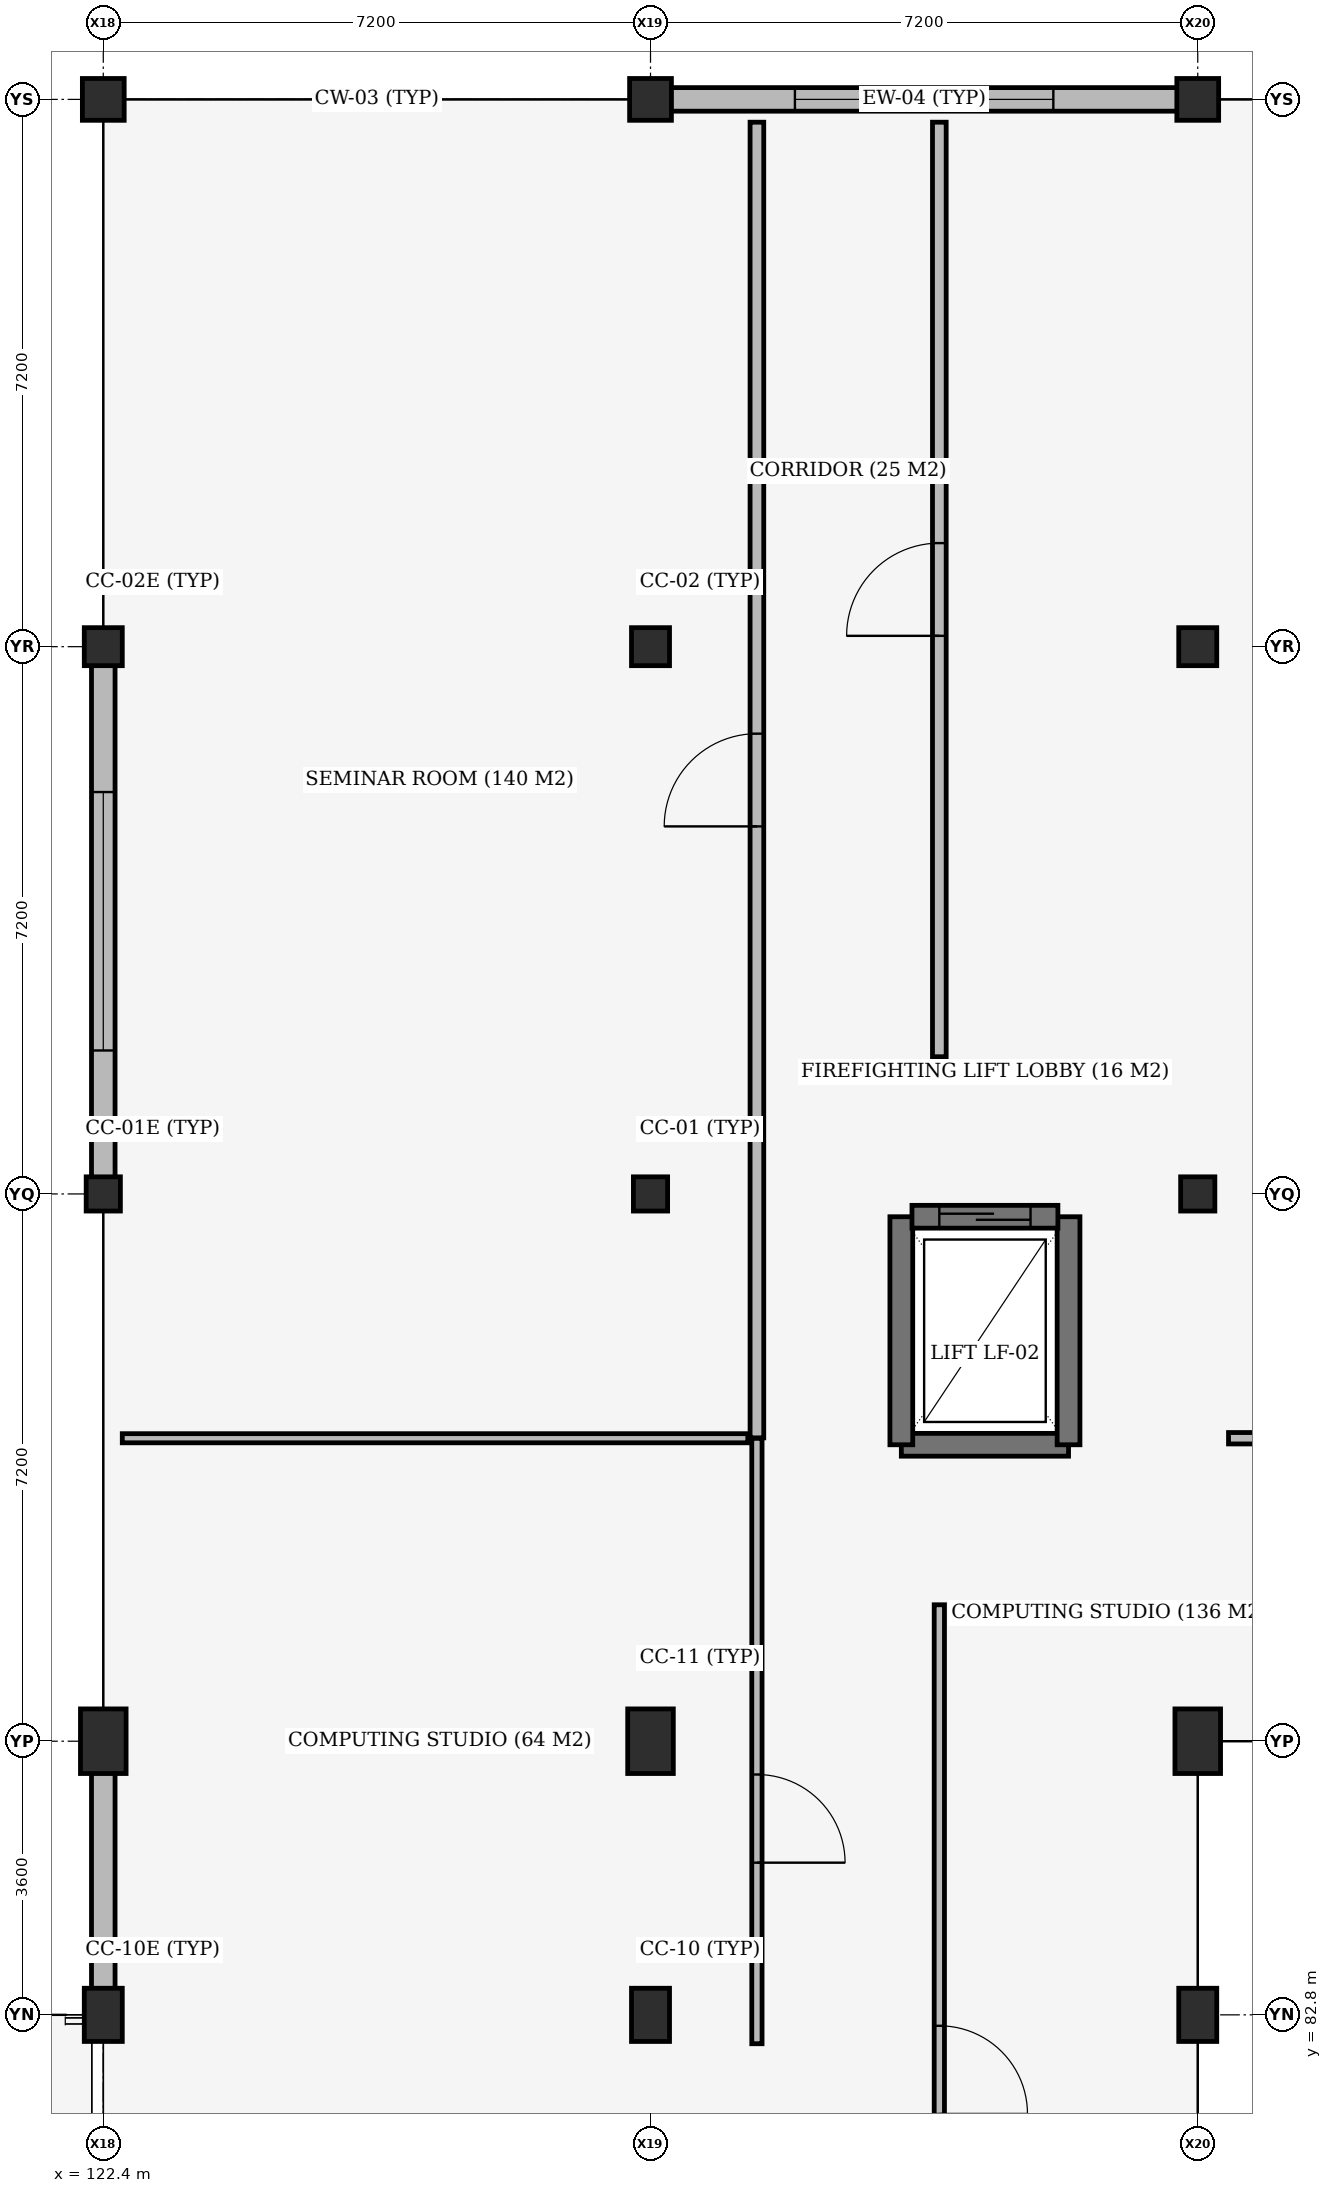
"""IFC4 building model, lengths in metres.
Left out: names, types, materials, properties, quantities, classifications, styles, units other than length and angle.
Written with IfcOpenShell. Run it as: python <this file> out.ifc"""

import sys

from ifc_helpers import new_model, si_unit, direction, frame, frame_2d, origin, origin_2d, place, context, subcontext, project, spatial, rectangle, extrude, element, fill, save


model = new_model("IFC4")
c1 = context("Model", 3, precision=1e-05, world=origin(), true_north=direction((0.0, 1.0)))
c2 = subcontext(c1, "Body", "Model", "MODEL_VIEW")
j1 = project(units=[si_unit("LENGTHUNIT", "METRE"), si_unit("PLANEANGLEUNIT", "RADIAN")], contexts=[c1])
p1 = place(None, origin())
s1 = spatial("IfcSite", under=j1, at=p1, CompositionType="ELEMENT")
p2 = place(p1, origin())
s2 = spatial("IfcBuilding", under=s1, at=p2, CompositionType="ELEMENT")
p3 = place(p2, frame((0.0, 0.0, 5.4)))
s3 = spatial("IfcBuildingStorey", under=s2, at=p3, CompositionType="ELEMENT", Elevation=5.4)
p4 = place(p3, frame((122.4, 82.8, 0.0), z_axis=(0.0, 0.0, 1.0), x_axis=(1.0, 0.0, 0.0)))
e1 = element("IfcColumn", 1, at=p4, inside=s3, PredefinedType="COLUMN", context=c2, shape_type="SweptSolid", body=[
    extrude(rectangle(XDim=0.5, YDim=0.7, at=origin_2d()), origin(), (0.0, 0.0, 1.0), 3.92),
])
p5 = place(p3, frame((122.4, 86.4, 0.0), z_axis=(0.0, 0.0, 1.0), x_axis=(1.0, 0.0, 0.0)))
e2 = element("IfcColumn", 2, at=p5, inside=s3, PredefinedType="COLUMN", context=c2, shape_type="SweptSolid", body=[
    extrude(rectangle(XDim=0.6, YDim=0.85, at=origin_2d()), origin(), (0.0, 0.0, 1.0), 3.92),
])
p6 = place(p3, frame((122.4, 93.6, 0.0), z_axis=(0.0, 0.0, 1.0), x_axis=(1.0, 0.0, 0.0)))
e3 = element("IfcColumn", 3, at=p6, inside=s3, PredefinedType="COLUMN", context=c2, shape_type="SweptSolid", body=[
    extrude(rectangle(XDim=0.45, YDim=0.45, at=origin_2d()), origin(), (0.0, 0.0, 1.0), 3.92),
])
p7 = place(p3, frame((122.4, 100.8, 0.0), z_axis=(0.0, 0.0, 1.0), x_axis=(1.0, 0.0, 0.0)))
e4 = element("IfcColumn", 4, at=p7, inside=s3, PredefinedType="COLUMN", context=c2, shape_type="SweptSolid", body=[
    extrude(rectangle(XDim=0.5, YDim=0.5, at=origin_2d()), origin(), (0.0, 0.0, 1.0), 3.92),
])
p8 = place(p3, frame((122.4, 108.0, 0.0), z_axis=(0.0, 0.0, 1.0), x_axis=(1.0, 0.0, 0.0)))
e5 = element("IfcColumn", 5, at=p8, inside=s3, PredefinedType="COLUMN", context=c2, shape_type="SweptSolid", body=[
    extrude(rectangle(XDim=0.55, YDim=0.55, at=origin_2d()), origin(), (0.0, 0.0, 1.0), 3.92),
])
p9 = place(p3, frame((129.6, 82.8, 0.0), z_axis=(0.0, 0.0, 1.0), x_axis=(1.0, 0.0, 0.0)))
e6 = element("IfcColumn", 6, at=p9, inside=s3, PredefinedType="COLUMN", context=c2, shape_type="SweptSolid", body=[
    extrude(rectangle(XDim=0.5, YDim=0.7, at=origin_2d()), origin(), (0.0, 0.0, 1.0), 3.92),
])
p10 = place(p3, frame((129.6, 86.4, 0.0), z_axis=(0.0, 0.0, 1.0), x_axis=(1.0, 0.0, 0.0)))
e7 = element("IfcColumn", 7, at=p10, inside=s3, PredefinedType="COLUMN", context=c2, shape_type="SweptSolid", body=[
    extrude(rectangle(XDim=0.6, YDim=0.85, at=origin_2d()), origin(), (0.0, 0.0, 1.0), 3.92),
])
p11 = place(p3, frame((129.6, 93.6, 0.0), z_axis=(0.0, 0.0, 1.0), x_axis=(1.0, 0.0, 0.0)))
e8 = element("IfcColumn", 8, at=p11, inside=s3, PredefinedType="COLUMN", context=c2, shape_type="SweptSolid", body=[
    extrude(rectangle(XDim=0.45, YDim=0.45, at=origin_2d()), origin(), (0.0, 0.0, 1.0), 3.92),
])
p12 = place(p3, frame((129.6, 100.8, 0.0), z_axis=(0.0, 0.0, 1.0), x_axis=(1.0, 0.0, 0.0)))
e9 = element("IfcColumn", 9, at=p12, inside=s3, PredefinedType="COLUMN", context=c2, shape_type="SweptSolid", body=[
    extrude(rectangle(XDim=0.5, YDim=0.5, at=origin_2d()), origin(), (0.0, 0.0, 1.0), 3.92),
])
p13 = place(p3, frame((129.6, 108.0, 0.0), z_axis=(0.0, 0.0, 1.0), x_axis=(1.0, 0.0, 0.0)))
e10 = element("IfcColumn", 10, at=p13, inside=s3, PredefinedType="COLUMN", context=c2, shape_type="SweptSolid", body=[
    extrude(rectangle(XDim=0.55, YDim=0.55, at=origin_2d()), origin(), (0.0, 0.0, 1.0), 3.92),
])
p14 = place(p3, frame((136.8, 82.8, 0.0), z_axis=(0.0, 0.0, 1.0), x_axis=(1.0, 0.0, 0.0)))
e11 = element("IfcColumn", 11, at=p14, inside=s3, PredefinedType="COLUMN", context=c2, shape_type="SweptSolid", body=[
    extrude(rectangle(XDim=0.5, YDim=0.7, at=origin_2d()), origin(), (0.0, 0.0, 1.0), 3.92),
])
p15 = place(p3, frame((136.8, 86.4, 0.0), z_axis=(0.0, 0.0, 1.0), x_axis=(1.0, 0.0, 0.0)))
e12 = element("IfcColumn", 12, at=p15, inside=s3, PredefinedType="COLUMN", context=c2, shape_type="SweptSolid", body=[
    extrude(rectangle(XDim=0.6, YDim=0.85, at=origin_2d()), origin(), (0.0, 0.0, 1.0), 3.92),
])
p16 = place(p3, frame((136.8, 93.6, 0.0), z_axis=(0.0, 0.0, 1.0), x_axis=(1.0, 0.0, 0.0)))
e13 = element("IfcColumn", 13, at=p16, inside=s3, PredefinedType="COLUMN", context=c2, shape_type="SweptSolid", body=[
    extrude(rectangle(XDim=0.45, YDim=0.45, at=origin_2d()), origin(), (0.0, 0.0, 1.0), 3.92),
])
p17 = place(p3, frame((136.8, 100.8, 0.0), z_axis=(0.0, 0.0, 1.0), x_axis=(1.0, 0.0, 0.0)))
e14 = element("IfcColumn", 14, at=p17, inside=s3, PredefinedType="COLUMN", context=c2, shape_type="SweptSolid", body=[
    extrude(rectangle(XDim=0.5, YDim=0.5, at=origin_2d()), origin(), (0.0, 0.0, 1.0), 3.92),
])
p18 = place(p3, frame((136.8, 108.0, 0.0), z_axis=(0.0, 0.0, 1.0), x_axis=(1.0, 0.0, 0.0)))
e15 = element("IfcColumn", 15, at=p18, inside=s3, PredefinedType="COLUMN", context=c2, shape_type="SweptSolid", body=[
    extrude(rectangle(XDim=0.55, YDim=0.55, at=origin_2d()), origin(), (0.0, 0.0, 1.0), 3.92),
])
p19 = place(p3, frame((132.9, 90.3, 0.0), z_axis=(0.0, 0.0, 1.0), x_axis=(1.0, 0.0, 0.0)))
e16 = element("IfcWall", 16, at=p19, inside=s3, PredefinedType="SHEAR", context=c2, shape_type="SweptSolid", body=[
    extrude(rectangle(XDim=2.2, YDim=0.3, at=frame_2d((1.1, 0.0))), origin(), (0.0, 0.0, 1.0), 3.92),
])
for number, where, z_axis, x_axis in (
    (17, (132.9, 93.3, 0.0), (0.0, 0.0, 1.0), (0.0, -1.0, 0.0)),
    (18, (135.1, 90.3, 0.0), (0.0, 0.0, 1.0), (0.0, 1.0, 0.0)),
):
    element("IfcWall", number, at=place(p3, frame(where, z_axis=z_axis, x_axis=x_axis)), inside=s3, PredefinedType="SHEAR", context=c2, shape_type="SweptSolid", body=[
        extrude(rectangle(XDim=3.0, YDim=0.3, at=frame_2d((1.5, 0.0))), origin(), (0.0, 0.0, 1.0), 3.92),
    ])
p20 = place(p3, frame((129.867, 108.0, 0.0), z_axis=(0.0, 0.0, 1.0), x_axis=(1.0, 0.0, 0.0)))
e19 = element("IfcWall", 19, at=p20, inside=s3, PredefinedType="STANDARD", context=c2, shape_type="SweptSolid", body=[
    extrude(rectangle(XDim=6.666, YDim=0.31, at=frame_2d((3.333, 0.0))), origin(), (0.0, 0.0, 1.0), 3.34),
])
p21 = place(p20, frame((1.633, 0.0, 0.9)))
e20 = element("IfcOpeningElement", 20, at=p21, cuts=e19, PredefinedType="OPENING", context=c2, shape_type="SweptSolid", body=[
    extrude(rectangle(XDim=3.4, YDim=1.5, at=frame_2d((1.7, 0.75))), frame((0.0, 0.165, 0.0), z_axis=(0.0, -1.0, 0.0), x_axis=(1.0, 0.0, 0.0)), (0.0, 0.0, 1.0), 0.33),
])
p22 = place(p3, frame((122.4, 83.142, 0.0), z_axis=(0.0, 0.0, 1.0), x_axis=(0.0, 1.0, 0.0)))
e21 = element("IfcWall", 21, at=p22, inside=s3, PredefinedType="STANDARD", context=c2, shape_type="SweptSolid", body=[
    extrude(rectangle(XDim=2.841, YDim=0.31, at=frame_2d((1.42, 0.0))), origin(), (0.0, 0.0, 1.0), 3.28),
])
p23 = place(p3, frame((122.4, 93.817, 0.0), z_axis=(0.0, 0.0, 1.0), x_axis=(0.0, 1.0, 0.0)))
e22 = element("IfcWall", 22, at=p23, inside=s3, PredefinedType="STANDARD", context=c2, shape_type="SweptSolid", body=[
    extrude(rectangle(XDim=6.741, YDim=0.31, at=frame_2d((3.371, 0.0))), origin(), (0.0, 0.0, 1.0), 3.18),
])
p24 = place(p23, frame((1.67, 0.0, 0.9)))
e23 = element("IfcOpeningElement", 23, at=p24, cuts=e22, PredefinedType="OPENING", context=c2, shape_type="SweptSolid", body=[
    extrude(rectangle(XDim=3.4, YDim=1.5, at=frame_2d((1.7, 0.75))), frame((0.0, 0.165, 0.0), z_axis=(0.0, -1.0, 0.0), x_axis=(1.0, 0.0, 0.0)), (0.0, 0.0, 1.0), 0.33),
])
p25 = place(p3, frame((133.04, 93.3, 0.0), z_axis=(0.0, 0.0, 1.0), x_axis=(1.0, 0.0, 0.0)))
e24 = element("IfcWall", 24, at=p25, inside=s3, PredefinedType="SHEAR", context=c2, shape_type="SweptSolid", body=[
    extrude(rectangle(XDim=1.92, YDim=0.3, at=frame_2d((0.96, 0.0))), origin(), (0.0, 0.0, 1.0), 3.92),
])
p26 = place(p25, frame((0.36, 0.0, 0.0)))
e25 = element("IfcOpeningElement", 25, at=p26, cuts=e24, PredefinedType="OPENING", context=c2, shape_type="SweptSolid", body=[
    extrude(rectangle(XDim=1.2, YDim=2.1, at=frame_2d((0.6, 1.05))), frame((0.0, 0.16, 0.0), z_axis=(0.0, -1.0, 0.0), x_axis=(1.0, 0.0, 0.0)), (0.0, 0.0, 1.0), 0.32),
])
p27 = place(p3, frame((131.0, 82.42, 0.0), z_axis=(0.0, 0.0, 1.0), x_axis=(0.0, 1.0, 0.0)))
e26 = element("IfcWall", 26, at=p27, inside=s3, PredefinedType="PARTITIONING", context=c2, shape_type="SweptSolid", body=[
    extrude(rectangle(XDim=7.966, YDim=0.135, at=frame_2d((3.983, 0.0))), origin(), (0.0, 0.0, 1.0), 3.34),
])
p28 = place(p27, frame((2.382, 0.0, 0.0)))
e27 = element("IfcOpeningElement", 27, at=p28, cuts=e26, PredefinedType="OPENING", context=c2, shape_type="SweptSolid", body=[
    extrude(rectangle(XDim=1.16, YDim=2.2, at=frame_2d((0.58, 1.1))), frame((0.0, 0.077, 0.0), z_axis=(0.0, -1.0, 0.0), x_axis=(1.0, 0.0, 0.0)), (0.0, 0.0, 1.0), 0.155),
])
p29 = place(p3, frame((122.65, 90.386, 0.0), z_axis=(0.0, 0.0, 1.0), x_axis=(1.0, 0.0, 0.0)))
e28 = element("IfcWall", 28, at=p29, inside=s3, PredefinedType="PARTITIONING", context=c2, shape_type="SweptSolid", body=[
    extrude(rectangle(XDim=8.23, YDim=0.12, at=frame_2d((4.115, 0.0))), origin(), (0.0, 0.0, 1.0), 3.34),
])
p30 = place(p3, frame((131.0, 90.391, 0.0), z_axis=(0.0, 0.0, 1.0), x_axis=(0.0, 1.0, 0.0)))
e29 = element("IfcWall", 29, at=p30, inside=s3, PredefinedType="PARTITIONING", context=c2, shape_type="SweptSolid", body=[
    extrude(rectangle(XDim=17.309, YDim=0.18, at=frame_2d((8.654, 0.0))), origin(), (0.0, 0.0, 1.0), 3.18),
])
p31 = place(p30, frame((8.044, 0.0, 0.0)))
e30 = element("IfcOpeningElement", 30, at=p31, cuts=e29, PredefinedType="OPENING", context=c2, shape_type="SweptSolid", body=[
    extrude(rectangle(XDim=1.22, YDim=2.25, at=frame_2d((0.61, 1.125))), frame((0.0, 0.1, 0.0), z_axis=(0.0, -1.0, 0.0), x_axis=(1.0, 0.0, 0.0)), (0.0, 0.0, 1.0), 0.2),
])
p32 = place(p3, frame((133.4, 75.957, 0.0), z_axis=(0.0, 0.0, 1.0), x_axis=(0.0, 1.0, 0.0)))
e31 = element("IfcWall", 31, at=p32, inside=s3, PredefinedType="PARTITIONING", context=c2, shape_type="SweptSolid", body=[
    extrude(rectangle(XDim=12.238, YDim=0.135, at=frame_2d((6.119, 0.0))), origin(), (0.0, 0.0, 1.0), 3.34),
])
p33 = place(p32, frame((5.539, 0.0, 0.0)))
e32 = element("IfcOpeningElement", 32, at=p33, cuts=e31, PredefinedType="OPENING", context=c2, shape_type="SweptSolid", body=[
    extrude(rectangle(XDim=1.16, YDim=2.2, at=frame_2d((0.58, 1.1))), frame((0.0, 0.077, 0.0), z_axis=(0.0, -1.0, 0.0), x_axis=(1.0, 0.0, 0.0)), (0.0, 0.0, 1.0), 0.155),
])
p34 = place(p3, frame((137.205, 90.386, 0.0), z_axis=(0.0, 0.0, 1.0), x_axis=(1.0, 0.0, 0.0)))
e33 = element("IfcWall", 33, at=p34, inside=s3, PredefinedType="PARTITIONING", context=c2, shape_type="SweptSolid", body=[
    extrude(rectangle(XDim=21.99, YDim=0.15, at=frame_2d((10.995, 0.0))), origin(), (0.0, 0.0, 1.0), 3.18),
])
p35 = place(p3, frame((133.4, 95.405, 0.0), z_axis=(0.0, 0.0, 1.0), x_axis=(0.0, 1.0, 0.0)))
e34 = element("IfcWall", 34, at=p35, inside=s3, PredefinedType="PARTITIONING", context=c2, shape_type="SweptSolid", body=[
    extrude(rectangle(XDim=12.295, YDim=0.18, at=frame_2d((6.147, 0.0))), origin(), (0.0, 0.0, 1.0), 3.18),
])
p36 = place(p35, frame((5.538, 0.0, 0.0)))
e35 = element("IfcOpeningElement", 35, at=p36, cuts=e34, PredefinedType="OPENING", context=c2, shape_type="SweptSolid", body=[
    extrude(rectangle(XDim=1.22, YDim=2.25, at=frame_2d((0.61, 1.125))), frame((0.0, 0.1, 0.0), z_axis=(0.0, -1.0, 0.0), x_axis=(1.0, 0.0, 0.0)), (0.0, 0.0, 1.0), 0.2),
])
p37 = place(p21, origin())
e36 = element("IfcWindow", 36, at=p37, inside=s3, PartitioningType="DOUBLE_PANEL_VERTICAL", PredefinedType="WINDOW", context=c2, shape_type="SweptSolid", body=[
    extrude(rectangle(XDim=3.4, YDim=1.5, at=frame_2d((1.7, 0.75))), frame((0.0, 0.03, 0.0), z_axis=(0.0, -1.0, 0.0), x_axis=(1.0, 0.0, 0.0)), (0.0, 0.0, 1.0), 0.06),
])
fill(e20, e36)
p38 = place(p24, origin())
e37 = element("IfcWindow", 37, at=p38, inside=s3, PartitioningType="DOUBLE_PANEL_VERTICAL", PredefinedType="WINDOW", context=c2, shape_type="SweptSolid", body=[
    extrude(rectangle(XDim=3.4, YDim=1.5, at=frame_2d((1.7, 0.75))), frame((0.0, 0.03, 0.0), z_axis=(0.0, -1.0, 0.0), x_axis=(1.0, 0.0, 0.0)), (0.0, 0.0, 1.0), 0.06),
])
fill(e23, e37)
p39 = place(p26, origin())
e38 = element("IfcDoor", 38, at=p39, inside=s3, OperationType="SLIDING_TO_LEFT", PredefinedType="DOOR", context=c2, shape_type="SweptSolid", body=[
    extrude(rectangle(XDim=1.2, YDim=2.1, at=frame_2d((0.6, 1.05))), frame((0.0, 0.025, 0.0), z_axis=(0.0, -1.0, 0.0), x_axis=(1.0, 0.0, 0.0)), (0.0, 0.0, 1.0), 0.05),
])
fill(e25, e38)
p40 = place(p28, origin())
e39 = element("IfcDoor", 39, at=p40, inside=s3, OperationType="SINGLE_SWING_RIGHT", PredefinedType="DOOR", context=c2, shape_type="SweptSolid", body=[
    extrude(rectangle(XDim=1.16, YDim=2.2, at=frame_2d((0.58, 1.1))), frame((0.0, 0.025, 0.0), z_axis=(0.0, -1.0, 0.0), x_axis=(1.0, 0.0, 0.0)), (0.0, 0.0, 1.0), 0.05),
])
fill(e27, e39)
p41 = place(p31, origin())
e40 = element("IfcDoor", 40, at=p41, inside=s3, OperationType="SINGLE_SWING_LEFT", PredefinedType="DOOR", context=c2, shape_type="SweptSolid", body=[
    extrude(rectangle(XDim=1.22, YDim=2.25, at=frame_2d((0.61, 1.125))), frame((0.0, 0.025, 0.0), z_axis=(0.0, -1.0, 0.0), x_axis=(1.0, 0.0, 0.0)), (0.0, 0.0, 1.0), 0.05),
])
fill(e30, e40)
p42 = place(p33, origin())
e41 = element("IfcDoor", 41, at=p42, inside=s3, OperationType="SINGLE_SWING_RIGHT", PredefinedType="DOOR", context=c2, shape_type="SweptSolid", body=[
    extrude(rectangle(XDim=1.16, YDim=2.2, at=frame_2d((0.58, 1.1))), frame((0.0, 0.025, 0.0), z_axis=(0.0, -1.0, 0.0), x_axis=(1.0, 0.0, 0.0)), (0.0, 0.0, 1.0), 0.05),
])
fill(e32, e41)
p43 = place(p36, origin())
e42 = element("IfcDoor", 42, at=p43, inside=s3, OperationType="SINGLE_SWING_LEFT", PredefinedType="DOOR", context=c2, shape_type="SweptSolid", body=[
    extrude(rectangle(XDim=1.22, YDim=2.25, at=frame_2d((0.61, 1.125))), frame((0.0, 0.025, 0.0), z_axis=(0.0, -1.0, 0.0), x_axis=(1.0, 0.0, 0.0)), (0.0, 0.0, 1.0), 0.05),
])
fill(e35, e42)
save(model, sys.argv[1])
